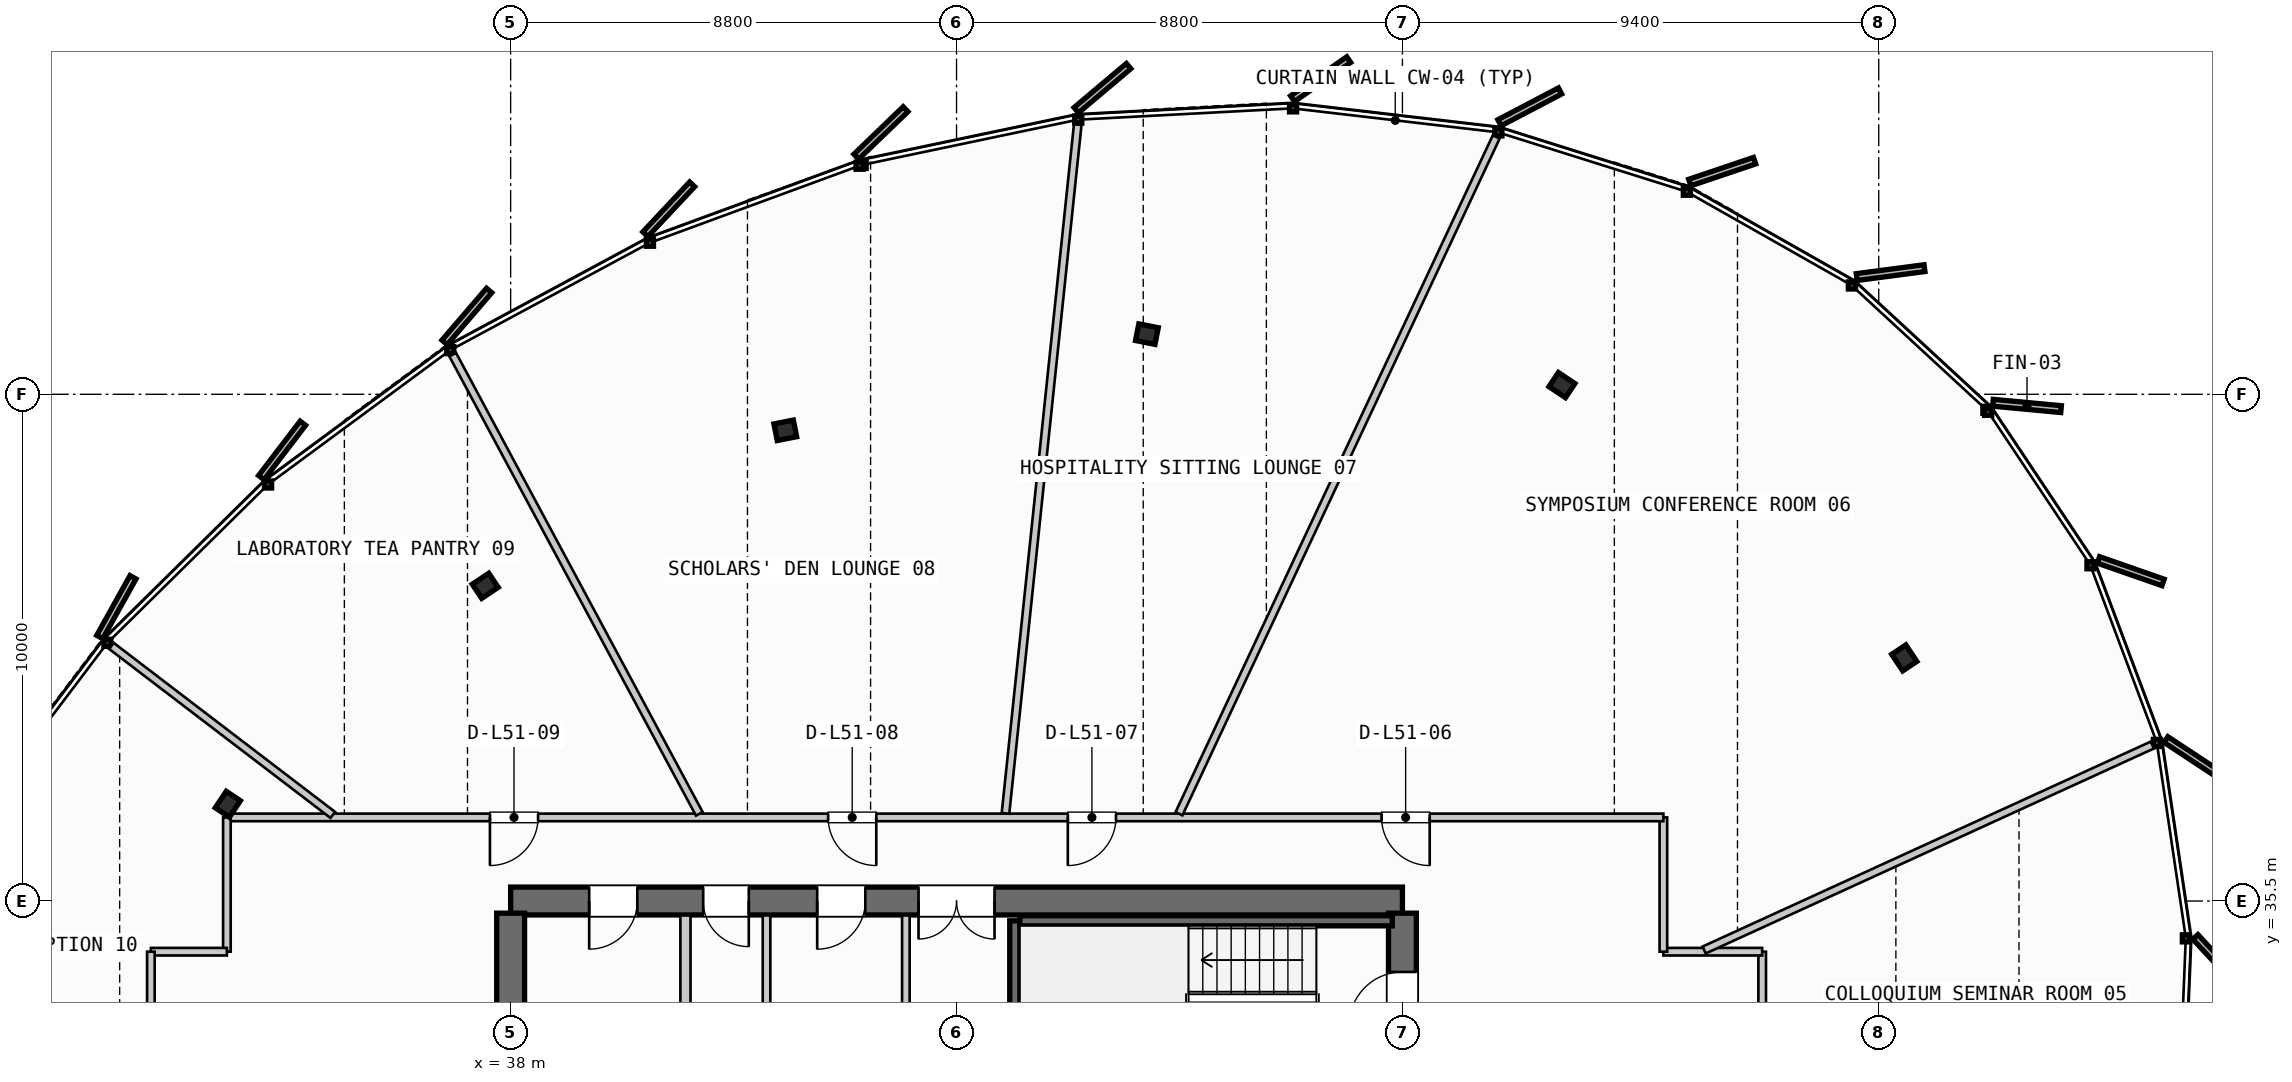
"""IFC4 building model, lengths in metres.
Left out: names, types, materials, properties, quantities, classifications, styles, units other than length and angle.
Written with IfcOpenShell. Run it as: python <this file> out.ifc"""

import sys

from ifc_helpers import new_model, si_unit, direction, frame, frame_2d, origin, origin_2d, place, context, subcontext, project, spatial, rectangle, i_section, extrude, source, transform, mapped, element, fill, save


model = new_model("IFC4")
c1 = context("Model", 3, precision=1e-05, world=origin(), true_north=direction((0.0, 1.0)))
c2 = subcontext(c1, "Body", "Model", "MODEL_VIEW")
j1 = project(units=[si_unit("LENGTHUNIT", "METRE"), si_unit("PLANEANGLEUNIT", "RADIAN")], contexts=[c1])
p1 = place(None, origin())
s1 = spatial("IfcSite", under=j1, at=p1, CompositionType="ELEMENT")
p2 = place(p1, origin())
s2 = spatial("IfcBuilding", under=s1, at=p2, CompositionType="ELEMENT")
p3 = place(p2, frame((0.0, 0.0, 197.4)))
s3 = spatial("IfcBuildingStorey", under=s2, at=p3, CompositionType="ELEMENT", Elevation=197.4)
p4 = place(p3, frame((55.6, 35.5, 0.0), z_axis=(0.0, 0.0, 1.0), x_axis=(-1.0, 0.0, 0.0)))
e1 = element("IfcWall", 1, at=p4, inside=s3, PredefinedType="SHEAR", context=c2, shape_type="SweptSolid", body=[
    extrude(rectangle(XDim=17.6, YDim=0.55, at=frame_2d((8.8, 0.0))), origin(), (0.0, 0.0, 1.0), 3.26),
])
p5 = place(p4, frame((8.05, 0.0, 0.0)))
e2 = element("IfcOpeningElement", 2, at=p5, cuts=e1, PredefinedType="OPENING", context=c2, shape_type="SweptSolid", body=[
    extrude(rectangle(XDim=1.5, YDim=2.2, at=frame_2d((0.75, 1.1))), frame((0.0, 0.285, 0.0), z_axis=(0.0, -1.0, 0.0), x_axis=(1.0, 0.0, 0.0)), (0.0, 0.0, 1.0), 0.57),
])
p6 = place(p4, frame((15.1, 0.0, 0.0)))
e3 = element("IfcOpeningElement", 3, at=p6, cuts=e1, PredefinedType="OPENING", context=c2, shape_type="SweptSolid", body=[
    extrude(rectangle(XDim=0.95, YDim=2.15, at=frame_2d((0.475, 1.075))), frame((0.0, 0.285, 0.0), z_axis=(0.0, -1.0, 0.0), x_axis=(1.0, 0.0, 0.0)), (0.0, 0.0, 1.0), 0.57),
])
p7 = place(p4, frame((12.9, 0.0, 0.0)))
e4 = element("IfcOpeningElement", 4, at=p7, cuts=e1, PredefinedType="OPENING", context=c2, shape_type="SweptSolid", body=[
    extrude(rectangle(XDim=0.9, YDim=2.15, at=frame_2d((0.45, 1.075))), frame((0.0, 0.285, 0.0), z_axis=(0.0, -1.0, 0.0), x_axis=(1.0, 0.0, 0.0)), (0.0, 0.0, 1.0), 0.57),
])
p8 = place(p4, frame((10.6, 0.0, 0.0)))
e5 = element("IfcOpeningElement", 5, at=p8, cuts=e1, PredefinedType="OPENING", context=c2, shape_type="SweptSolid", body=[
    extrude(rectangle(XDim=0.95, YDim=2.15, at=frame_2d((0.475, 1.075))), frame((0.0, 0.285, 0.0), z_axis=(0.0, -1.0, 0.0), x_axis=(1.0, 0.0, 0.0)), (0.0, 0.0, 1.0), 0.57),
])
p9 = place(p3, frame((38.0, 35.26, 0.0), z_axis=(0.0, 0.0, 1.0), x_axis=(0.0, -1.0, 0.0)))
e6 = element("IfcWall", 6, at=p9, inside=s3, PredefinedType="SHEAR", context=c2, shape_type="SweptSolid", body=[
    extrude(rectangle(XDim=14.92, YDim=0.55, at=frame_2d((7.46, 0.0))), origin(), (0.0, 0.0, 1.0), 3.26),
])
p10 = place(p9, frame((5.21, 0.0, 0.0)))
e7 = element("IfcOpeningElement", 7, at=p10, cuts=e6, PredefinedType="OPENING", context=c2, shape_type="SweptSolid", body=[
    extrude(rectangle(XDim=1.1, YDim=2.2, at=frame_2d((0.55, 1.1))), frame((0.0, 0.285, 0.0), z_axis=(0.0, -1.0, 0.0), x_axis=(1.0, 0.0, 0.0)), (0.0, 0.0, 1.0), 0.57),
])
p11 = place(p3, frame((55.6, 20.34, 0.0), z_axis=(0.0, 0.0, 1.0), x_axis=(0.0, 1.0, 0.0)))
e8 = element("IfcWall", 8, at=p11, inside=s3, PredefinedType="SHEAR", context=c2, shape_type="SweptSolid", body=[
    extrude(rectangle(XDim=14.92, YDim=0.55, at=frame_2d((7.46, 0.0))), origin(), (0.0, 0.0, 1.0), 3.26),
])
p12 = place(p11, frame((12.71, 0.0, 0.0)))
e9 = element("IfcOpeningElement", 9, at=p12, cuts=e8, PredefinedType="OPENING", context=c2, shape_type="SweptSolid", body=[
    extrude(rectangle(XDim=1.05, YDim=2.15, at=frame_2d((0.525, 1.075))), frame((0.0, 0.285, 0.0), z_axis=(0.0, -1.0, 0.0), x_axis=(1.0, 0.0, 0.0)), (0.0, 0.0, 1.0), 0.57),
])
p13 = place(p11, frame((8.61, 0.0, 0.0)))
e10 = element("IfcOpeningElement", 10, at=p13, cuts=e8, PredefinedType="OPENING", context=c2, shape_type="SweptSolid", body=[
    extrude(rectangle(XDim=1.1, YDim=2.2, at=frame_2d((0.55, 1.1))), frame((0.0, 0.285, 0.0), z_axis=(0.0, -1.0, 0.0), x_axis=(1.0, 0.0, 0.0)), (0.0, 0.0, 1.0), 0.57),
])
m1 = source(origin(), c2, "Body", "SweptSolid", [
    extrude(i_section(OverallWidth=0.391, OverallDepth=0.335, WebThickness=0.023, FlangeThickness=0.034, FilletRadius=0.015, at=origin_2d()), origin(), (0.0, 0.0, 1.0), 3.26),
])
for number, where, z_axis, x_axis in (
    (11, (65.504, 40.298, 0.0), (0.0, 0.0, 1.0), (0.831, 0.556, 0.0)),
    (12, (58.748, 45.681, 0.0), (0.0, 0.0, 1.0), (0.556, 0.831, 0.0)),
    (13, (50.557, 46.688, 0.0), (0.0, 0.0, 1.0), (0.195, 0.981, 0.0)),
    (14, (43.421, 44.789, 0.0), (0.0, 0.0, 1.0), (-0.195, 0.981, 0.0)),
    (15, (37.499, 41.72, 0.0), (0.0, 0.0, 1.0), (-0.556, 0.831, 0.0)),
    (16, (32.418, 37.409, 0.0), (0.0, 0.0, 1.0), (-0.831, 0.556, 0.0)),
):
    element("IfcColumn", number, at=place(p3, frame(where, z_axis=z_axis, x_axis=x_axis)), inside=s3, PredefinedType="COLUMN", context=c2, shape_type="MappedRepresentation", body=[
        mapped(m1, transform((0.0, 0.0, 0.0), scale=1.0)),
    ])
p14 = place(p3, frame((47.95, 32.05, 0.0), z_axis=(0.0, 0.0, 1.0), x_axis=(0.0, 1.0, 0.0)))
e17 = element("IfcWall", 17, at=p14, inside=s3, PredefinedType="SHEAR", context=c2, shape_type="SweptSolid", body=[
    extrude(rectangle(XDim=3.06, YDim=0.2, at=frame_2d((1.53, 0.0))), origin(), (0.0, 0.0, 1.0), 3.26),
])
p15 = place(p3, frame((48.05, 35.11, 0.0), z_axis=(0.0, 0.0, 1.0), x_axis=(1.0, 0.0, 0.0)))
e18 = element("IfcWall", 18, at=p15, inside=s3, PredefinedType="SHEAR", context=c2, shape_type="SweptSolid", body=[
    extrude(rectangle(XDim=7.35, YDim=0.2, at=frame_2d((3.675, 0.0))), origin(), (0.0, 0.0, 1.0), 3.26),
])
p16 = place(p3, frame((41.45, 31.85, 0.0), z_axis=(0.0, 0.0, 1.0), x_axis=(0.0, 1.0, 0.0)))
e19 = element("IfcWall", 19, at=p16, inside=s3, PredefinedType="PARTITIONING", context=c2, shape_type="SweptSolid", body=[
    extrude(rectangle(XDim=3.365, YDim=0.2, at=frame_2d((1.683, 0.0))), origin(), (0.0, 0.0, 1.0), 2.595),
])
p17 = place(p3, frame((45.8, 31.85, 0.0), z_axis=(0.0, 0.0, 1.0), x_axis=(0.0, 1.0, 0.0)))
e20 = element("IfcWall", 20, at=p17, inside=s3, PredefinedType="PARTITIONING", context=c2, shape_type="SweptSolid", body=[
    extrude(rectangle(XDim=3.365, YDim=0.15, at=frame_2d((1.683, 0.0))), origin(), (0.0, 0.0, 1.0), 2.595),
])
p18 = place(p3, frame((43.05, 31.85, 0.0), z_axis=(0.0, 0.0, 1.0), x_axis=(0.0, 1.0, 0.0)))
e21 = element("IfcWall", 21, at=p18, inside=s3, PredefinedType="PLUMBINGWALL", context=c2, shape_type="SweptSolid", body=[
    extrude(rectangle(XDim=3.365, YDim=0.15, at=frame_2d((1.683, 0.0))), origin(), (0.0, 0.0, 1.0), 2.595),
])
p19 = place(p3, frame((62.7, 32.8, 0.0), z_axis=(0.0, 0.0, 1.0), x_axis=(0.0, 1.0, 0.0)))
e22 = element("IfcWall", 22, at=p19, inside=s3, PredefinedType="PARTITIONING", context=c2, shape_type="SweptSolid", body=[
    extrude(rectangle(XDim=1.7, YDim=0.15, at=frame_2d((0.85, 0.0))), origin(), (0.0, 0.0, 1.0), 2.595),
])
p20 = place(p3, frame((62.7, 34.5, 0.0), z_axis=(0.0, 0.0, 1.0), x_axis=(-1.0, 0.0, 0.0)))
e23 = element("IfcWall", 23, at=p20, inside=s3, PredefinedType="PARTITIONING", context=c2, shape_type="SweptSolid", body=[
    extrude(rectangle(XDim=1.95, YDim=0.15, at=frame_2d((0.975, 0.0))), origin(), (0.0, 0.0, 1.0), 2.595),
])
p21 = place(p3, frame((60.75, 34.5, 0.0), z_axis=(0.0, 0.0, 1.0), x_axis=(0.0, 1.0, 0.0)))
e24 = element("IfcWall", 24, at=p21, inside=s3, PredefinedType="PARTITIONING", context=c2, shape_type="SweptSolid", body=[
    extrude(rectangle(XDim=2.65, YDim=0.15, at=frame_2d((1.325, 0.0))), origin(), (0.0, 0.0, 1.0), 2.595),
])
p22 = place(p3, frame((60.75, 37.15, 0.0), z_axis=(0.0, 0.0, 1.0), x_axis=(-1.0, 0.0, 0.0)))
e25 = element("IfcWall", 25, at=p22, inside=s3, PredefinedType="PARTITIONING", context=c2, shape_type="SweptSolid", body=[
    extrude(rectangle(XDim=28.35, YDim=0.15, at=frame_2d((14.175, 0.0))), origin(), (0.0, 0.0, 1.0), 2.595),
])
p23 = place(p22, frame((4.612, 0.0, 0.0)))
e26 = element("IfcOpeningElement", 26, at=p23, cuts=e25, PredefinedType="OPENING", context=c2, shape_type="SweptSolid", body=[
    extrude(rectangle(XDim=0.95, YDim=2.15, at=frame_2d((0.475, 1.075))), frame((0.0, 0.085, 0.0), z_axis=(0.0, -1.0, 0.0), x_axis=(1.0, 0.0, 0.0)), (0.0, 0.0, 1.0), 0.17),
])
p24 = place(p22, frame((10.803, 0.0, 0.0)))
e27 = element("IfcOpeningElement", 27, at=p24, cuts=e25, PredefinedType="OPENING", context=c2, shape_type="SweptSolid", body=[
    extrude(rectangle(XDim=0.95, YDim=2.15, at=frame_2d((0.475, 1.075))), frame((0.0, 0.085, 0.0), z_axis=(0.0, -1.0, 0.0), x_axis=(1.0, 0.0, 0.0)), (0.0, 0.0, 1.0), 0.17),
])
p25 = place(p22, frame((15.534, 0.0, 0.0)))
e28 = element("IfcOpeningElement", 28, at=p25, cuts=e25, PredefinedType="OPENING", context=c2, shape_type="SweptSolid", body=[
    extrude(rectangle(XDim=0.95, YDim=2.15, at=frame_2d((0.475, 1.075))), frame((0.0, 0.085, 0.0), z_axis=(0.0, -1.0, 0.0), x_axis=(1.0, 0.0, 0.0)), (0.0, 0.0, 1.0), 0.17),
])
p26 = place(p22, frame((22.208, 0.0, 0.0)))
e29 = element("IfcOpeningElement", 29, at=p26, cuts=e25, PredefinedType="OPENING", context=c2, shape_type="SweptSolid", body=[
    extrude(rectangle(XDim=0.95, YDim=2.15, at=frame_2d((0.475, 1.075))), frame((0.0, 0.085, 0.0), z_axis=(0.0, -1.0, 0.0), x_axis=(1.0, 0.0, 0.0)), (0.0, 0.0, 1.0), 0.17),
])
p27 = place(p3, frame((32.4, 37.15, 0.0), z_axis=(0.0, 0.0, 1.0), x_axis=(0.0, -1.0, 0.0)))
e30 = element("IfcWall", 30, at=p27, inside=s3, PredefinedType="PARTITIONING", context=c2, shape_type="SweptSolid", body=[
    extrude(rectangle(XDim=2.65, YDim=0.15, at=frame_2d((1.325, 0.0))), origin(), (0.0, 0.0, 1.0), 2.595),
])
p28 = place(p3, frame((32.4, 34.5, 0.0), z_axis=(0.0, 0.0, 1.0), x_axis=(-1.0, 0.0, 0.0)))
e31 = element("IfcWall", 31, at=p28, inside=s3, PredefinedType="PARTITIONING", context=c2, shape_type="SweptSolid", body=[
    extrude(rectangle(XDim=1.5, YDim=0.15, at=frame_2d((0.75, 0.0))), origin(), (0.0, 0.0, 1.0), 2.595),
])
p29 = place(p3, frame((30.9, 34.5, 0.0), z_axis=(0.0, 0.0, 1.0), x_axis=(0.0, -1.0, 0.0)))
e32 = element("IfcWall", 32, at=p29, inside=s3, PredefinedType="PARTITIONING", context=c2, shape_type="SweptSolid", body=[
    extrude(rectangle(XDim=1.7, YDim=0.15, at=frame_2d((0.85, 0.0))), origin(), (0.0, 0.0, 1.0), 2.595),
])
p30 = place(p3, frame((61.554, 34.533, 0.0), z_axis=(0.0, 0.0, 1.0), x_axis=(0.909424572648, 0.415868905623, 0.0)))
e33 = element("IfcWall", 33, at=p30, inside=s3, PredefinedType="PARTITIONING", context=c2, shape_type="SweptSolid", body=[
    extrude(rectangle(XDim=9.726, YDim=0.15, at=frame_2d((4.863, 0.0))), origin(), (0.0, 0.0, 1.0), 2.595),
])
p31 = place(p3, frame((51.19, 37.222, 0.0), z_axis=(0.0, 0.0, 1.0), x_axis=(0.424442356948, 0.905454960574, 0.0)))
e34 = element("IfcWall", 34, at=p31, inside=s3, PredefinedType="PARTITIONING", context=c2, shape_type="SweptSolid", body=[
    extrude(rectangle(XDim=14.751, YDim=0.15, at=frame_2d((7.375, 0.0))), origin(), (0.0, 0.0, 1.0), 2.595),
])
p32 = place(p3, frame((47.766, 37.229, 0.0), z_axis=(0.0, 0.0, 1.0), x_axis=(0.104327686944, 0.99454297732, 0.0)))
e35 = element("IfcWall", 35, at=p32, inside=s3, PredefinedType="PARTITIONING", context=c2, shape_type="SweptSolid", body=[
    extrude(rectangle(XDim=13.666, YDim=0.15, at=frame_2d((6.833, 0.0))), origin(), (0.0, 0.0, 1.0), 2.595),
])
p33 = place(p3, frame((41.723, 37.22, 0.0), z_axis=(0.0, 0.0, 1.0), x_axis=(-0.473110264435, 0.88100322229, 0.0)))
e36 = element("IfcWall", 36, at=p33, inside=s3, PredefinedType="PARTITIONING", context=c2, shape_type="SweptSolid", body=[
    extrude(rectangle(XDim=10.287, YDim=0.15, at=frame_2d((5.144, 0.0))), origin(), (0.0, 0.0, 1.0), 2.595),
])
p34 = place(p3, frame((34.49, 37.198, 0.0), z_axis=(0.0, 0.0, 1.0), x_axis=(-0.794783785462, 0.606892687686, 0.0)))
e37 = element("IfcWall", 37, at=p34, inside=s3, PredefinedType="PARTITIONING", context=c2, shape_type="SweptSolid", body=[
    extrude(rectangle(XDim=5.496, YDim=0.15, at=frame_2d((2.748, 0.0))), origin(), (0.0, 0.0, 1.0), 2.595),
])
m2 = source(origin(), c2, "Body", "SweptSolid", [
    extrude(rectangle(XDim=1.05, YDim=2.15, at=frame_2d((0.525, 1.075))), frame((0.0, 0.025, 0.0), z_axis=(0.0, -1.0, 0.0), x_axis=(1.0, 0.0, 0.0)), (0.0, 0.0, 1.0), 0.05),
])
p35 = place(p12, origin())
e38 = element("IfcDoor", 38, at=p35, inside=s3, OperationType="SINGLE_SWING_LEFT", PredefinedType="DOOR", context=c2, shape_type="MappedRepresentation", body=[
    mapped(m2, transform((0.0, 0.0, 0.0), scale=1.0)),
])
fill(e9, e38)
m3 = source(origin(), c2, "Body", "SweptSolid", [
    extrude(rectangle(XDim=1.5, YDim=2.2, at=frame_2d((0.75, 1.1))), frame((0.0, 0.025, 0.0), z_axis=(0.0, -1.0, 0.0), x_axis=(1.0, 0.0, 0.0)), (0.0, 0.0, 1.0), 0.05),
])
p36 = place(p5, origin())
e39 = element("IfcDoor", 39, at=p36, inside=s3, OperationType="DOUBLE_DOOR_SINGLE_SWING", PredefinedType="DOOR", context=c2, shape_type="MappedRepresentation", body=[
    mapped(m3, transform((0.0, 0.0, 0.0), scale=1.0)),
])
fill(e2, e39)
m4 = source(origin(), c2, "Body", "SweptSolid", [
    extrude(rectangle(XDim=0.95, YDim=2.15, at=frame_2d((0.475, 1.075))), frame((0.0, 0.025, 0.0), z_axis=(0.0, -1.0, 0.0), x_axis=(1.0, 0.0, 0.0)), (0.0, 0.0, 1.0), 0.05),
])
p37 = place(p6, origin())
e40 = element("IfcDoor", 40, at=p37, inside=s3, OperationType="SINGLE_SWING_RIGHT", PredefinedType="DOOR", context=c2, shape_type="MappedRepresentation", body=[
    mapped(m4, transform((0.0, 0.0, 0.0), scale=1.0)),
])
fill(e3, e40)
m5 = source(origin(), c2, "Body", "SweptSolid", [
    extrude(rectangle(XDim=0.9, YDim=2.15, at=frame_2d((0.45, 1.075))), frame((0.0, 0.025, 0.0), z_axis=(0.0, -1.0, 0.0), x_axis=(1.0, 0.0, 0.0)), (0.0, 0.0, 1.0), 0.05),
])
p38 = place(p7, origin())
e41 = element("IfcDoor", 41, at=p38, inside=s3, OperationType="SINGLE_SWING_LEFT", PredefinedType="DOOR", context=c2, shape_type="MappedRepresentation", body=[
    mapped(m5, transform((0.0, 0.0, 0.0), scale=1.0)),
])
fill(e4, e41)
p39 = place(p8, origin())
e42 = element("IfcDoor", 42, at=p39, inside=s3, OperationType="SINGLE_SWING_RIGHT", PredefinedType="DOOR", context=c2, shape_type="MappedRepresentation", body=[
    mapped(m4, transform((0.0, 0.0, 0.0), scale=1.0)),
])
fill(e5, e42)
p40 = place(p23, origin())
e43 = element("IfcDoor", 43, at=p40, inside=s3, OperationType="SINGLE_SWING_LEFT", PredefinedType="DOOR", context=c2, shape_type="MappedRepresentation", body=[
    mapped(m4, transform((0.0, 0.0, 0.0), scale=1.0)),
])
fill(e26, e43)
p41 = place(p24, origin())
e44 = element("IfcDoor", 44, at=p41, inside=s3, OperationType="SINGLE_SWING_RIGHT", PredefinedType="DOOR", context=c2, shape_type="MappedRepresentation", body=[
    mapped(m4, transform((0.0, 0.0, 0.0), scale=1.0)),
])
fill(e27, e44)
p42 = place(p25, origin())
e45 = element("IfcDoor", 45, at=p42, inside=s3, OperationType="SINGLE_SWING_LEFT", PredefinedType="DOOR", context=c2, shape_type="MappedRepresentation", body=[
    mapped(m4, transform((0.0, 0.0, 0.0), scale=1.0)),
])
fill(e28, e45)
p43 = place(p26, origin())
e46 = element("IfcDoor", 46, at=p43, inside=s3, OperationType="SINGLE_SWING_RIGHT", PredefinedType="DOOR", context=c2, shape_type="MappedRepresentation", body=[
    mapped(m4, transform((0.0, 0.0, 0.0), scale=1.0)),
])
fill(e29, e46)
save(model, sys.argv[1])
